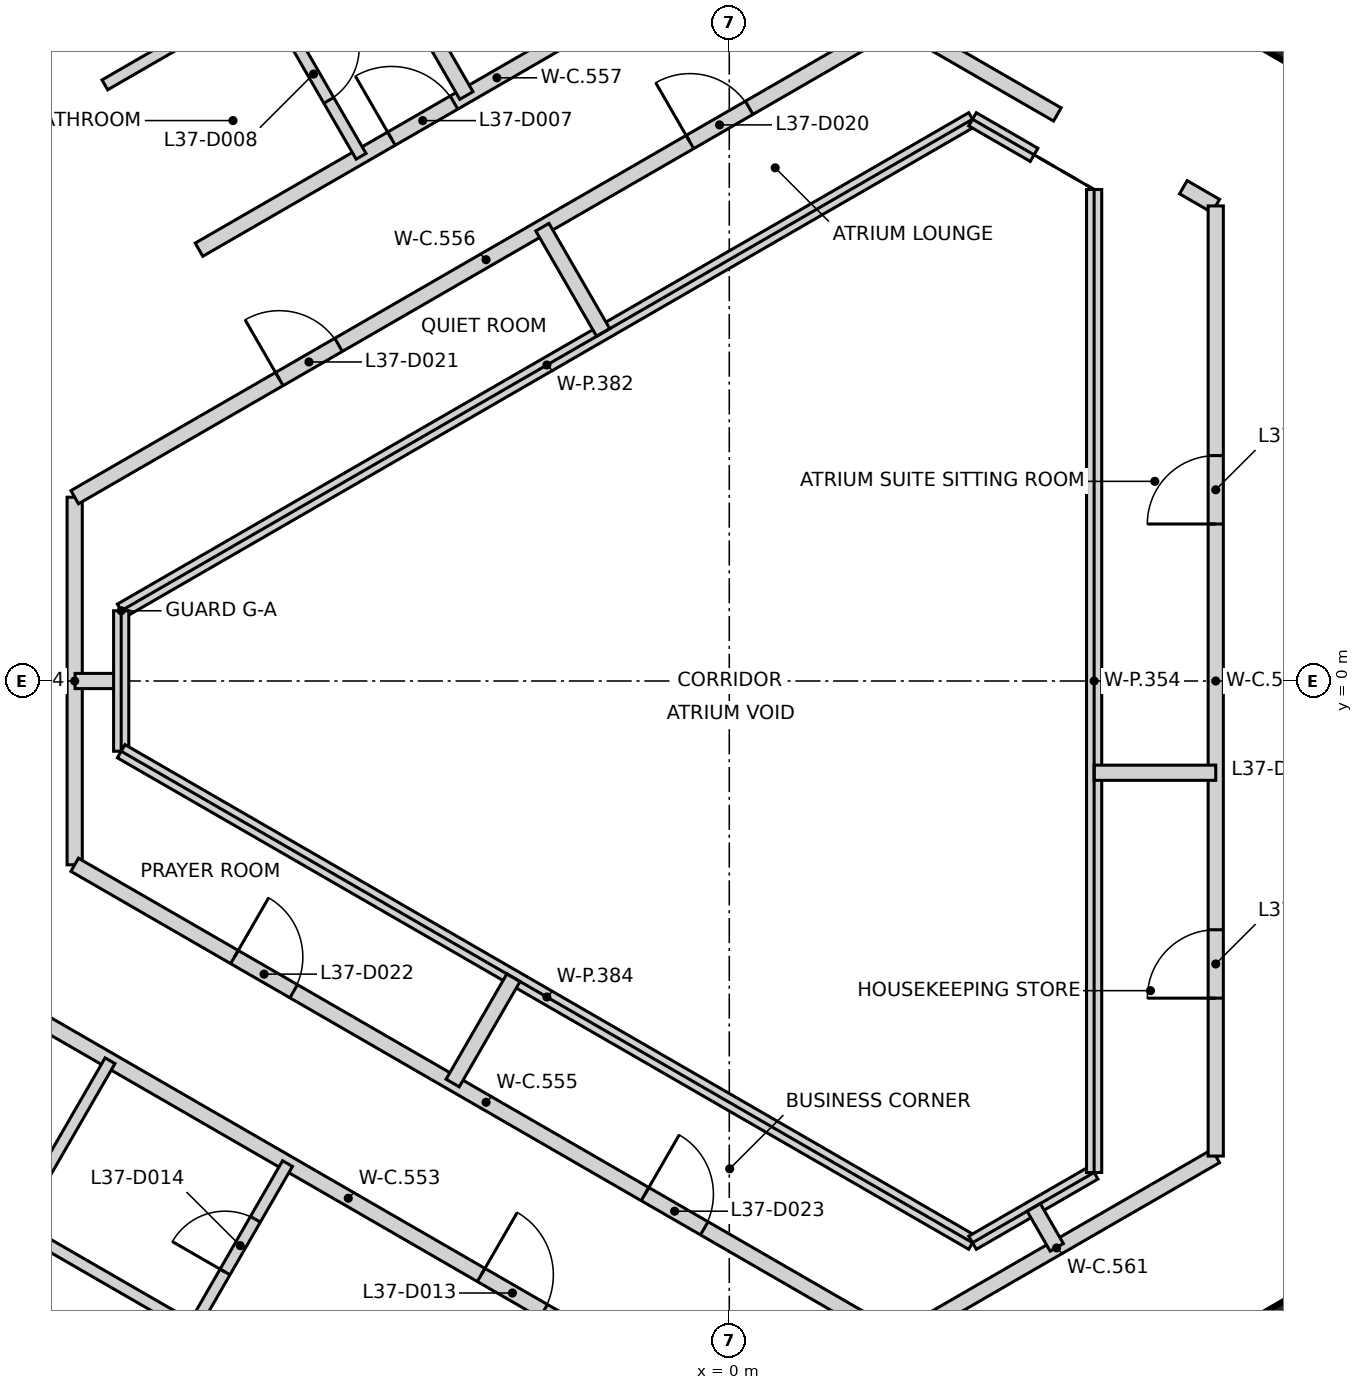
"""IFC4 building model, lengths in metres.
Left out: names, types, materials, properties, quantities, classifications, styles, units other than length and angle.
Written with IfcOpenShell. Run it as: python <this file> out.ifc"""

import sys

from ifc_helpers import new_model, si_unit, direction, frame, frame_2d, origin, place, context, subcontext, project, spatial, rectangle, extrude, element, fill, save


model = new_model("IFC4")
c1 = context("Model", 3, precision=1e-05, world=origin(), true_north=direction((0.0, 1.0)))
c2 = subcontext(c1, "Body", "Model", "MODEL_VIEW")
j1 = project(units=[si_unit("LENGTHUNIT", "METRE"), si_unit("PLANEANGLEUNIT", "RADIAN")], contexts=[c1])
p1 = place(None, origin())
s1 = spatial("IfcSite", under=j1, at=p1, CompositionType="ELEMENT")
p2 = place(p1, origin())
s2 = spatial("IfcBuilding", under=s1, at=p2, CompositionType="ELEMENT")
p3 = place(p2, frame((0.0, 0.0, 150.4)))
s3 = spatial("IfcBuildingStorey", under=s2, at=p3, CompositionType="ELEMENT", Elevation=150.4)
p4 = place(p3, frame((10.42, 6.498, 0.0), z_axis=(0.0, 0.0, 1.0), x_axis=(-0.866021906294, 0.500006057782, 0.0)))
e1 = element("IfcWall", 1, at=p4, inside=s3, PredefinedType="SHEAR", context=c2, shape_type="SweptSolid", body=[
    extrude(rectangle(XDim=11.55, YDim=0.25, at=frame_2d((5.775, 0.0))), origin(), (0.0, 0.0, 1.0), 3.2),
])
p5 = place(p4, frame((10.025, 0.0, 0.0)))
e2 = element("IfcOpeningElement", 2, at=p5, cuts=e1, PredefinedType="OPENING", context=c2, shape_type="SweptSolid", body=[
    extrude(rectangle(XDim=1.2, YDim=2.1, at=frame_2d((0.6, 1.05))), frame((0.0, 0.135, 0.0), z_axis=(0.0, -1.0, 0.0), x_axis=(1.0, 0.0, 0.0)), (0.0, 0.0, 1.0), 0.27),
])
p6 = place(p4, frame((8.725, 0.0, 0.0)))
e3 = element("IfcOpeningElement", 3, at=p6, cuts=e1, PredefinedType="OPENING", context=c2, shape_type="SweptSolid", body=[
    extrude(rectangle(XDim=1.2, YDim=2.1, at=frame_2d((0.6, 1.05))), frame((0.0, 0.135, 0.0), z_axis=(0.0, -1.0, 0.0), x_axis=(1.0, 0.0, 0.0)), (0.0, 0.0, 1.0), 0.27),
])
p7 = place(p3, frame((0.417, -12.273, 0.0), z_axis=(0.0, 0.0, 1.0), x_axis=(0.866021906294, 0.500006057782, 0.0)))
e4 = element("IfcWall", 4, at=p7, inside=s3, PredefinedType="SHEAR", context=c2, shape_type="SweptSolid", body=[
    extrude(rectangle(XDim=11.55, YDim=0.25, at=frame_2d((5.775, 0.0))), origin(), (0.0, 0.0, 1.0), 3.2),
])
p8 = place(p7, frame((10.025, 0.0, 0.0)))
e5 = element("IfcOpeningElement", 5, at=p8, cuts=e4, PredefinedType="OPENING", context=c2, shape_type="SweptSolid", body=[
    extrude(rectangle(XDim=1.2, YDim=2.1, at=frame_2d((0.6, 1.05))), frame((0.0, 0.135, 0.0), z_axis=(0.0, -1.0, 0.0), x_axis=(1.0, 0.0, 0.0)), (0.0, 0.0, 1.0), 0.27),
])
p9 = place(p7, frame((8.725, 0.0, 0.0)))
e6 = element("IfcOpeningElement", 6, at=p9, cuts=e4, PredefinedType="OPENING", context=c2, shape_type="SweptSolid", body=[
    extrude(rectangle(XDim=1.2, YDim=2.1, at=frame_2d((0.6, 1.05))), frame((0.0, 0.135, 0.0), z_axis=(0.0, -1.0, 0.0), x_axis=(1.0, 0.0, 0.0)), (0.0, 0.0, 1.0), 0.27),
])
p10 = place(p3, frame((-9.261, -4.351, 0.0), z_axis=(0.0, 0.0, 1.0), x_axis=(0.865985037707, -0.500069909581, 0.0)))
e7 = element("IfcWall", 7, at=p10, inside=s3, PredefinedType="PARTITIONING", context=c2, shape_type="SweptSolid", body=[
    extrude(rectangle(XDim=9.812, YDim=0.2, at=frame_2d((4.906, 0.0))), origin(), (0.0, 0.0, 1.0), 3.2),
])
p11 = place(p10, frame((6.925, 0.0, 0.0)))
e8 = element("IfcOpeningElement", 8, at=p11, cuts=e7, PredefinedType="OPENING", context=c2, shape_type="SweptSolid", body=[
    extrude(rectangle(XDim=0.95, YDim=2.1, at=frame_2d((0.475, 1.05))), frame((0.0, 0.11, 0.0), z_axis=(0.0, -1.0, 0.0), x_axis=(1.0, 0.0, 0.0)), (0.0, 0.0, 1.0), 0.22),
])
p12 = place(p3, frame((-8.612, -2.418, 0.0), z_axis=(0.0, 0.0, 1.0), x_axis=(0.0, 1.0, 0.0)))
e9 = element("IfcWall", 9, at=p12, inside=s3, PredefinedType="PARTITIONING", context=c2, shape_type="SweptSolid", body=[
    extrude(rectangle(XDim=4.836, YDim=0.2, at=frame_2d((2.418, 0.0))), origin(), (0.0, 0.0, 1.0), 2.3),
])
p13 = place(p3, frame((-8.612, -2.418, 0.0), z_axis=(0.0, 0.0, 1.0), x_axis=(0.866023916678, -0.500002575735, 0.0)))
e10 = element("IfcWall", 10, at=p13, inside=s3, PredefinedType="PARTITIONING", context=c2, shape_type="SweptSolid", body=[
    extrude(rectangle(XDim=12.499, YDim=0.2, at=frame_2d((6.249, 0.0))), origin(), (0.0, 0.0, 1.0), 3.2),
])
p14 = place(p13, frame((2.427, 0.0, 0.0)))
e11 = element("IfcOpeningElement", 11, at=p14, cuts=e10, PredefinedType="OPENING", context=c2, shape_type="SweptSolid", body=[
    extrude(rectangle(XDim=0.9, YDim=2.1, at=frame_2d((0.45, 1.05))), frame((0.0, 0.11, 0.0), z_axis=(0.0, -1.0, 0.0), x_axis=(1.0, 0.0, 0.0)), (0.0, 0.0, 1.0), 0.22),
])
p15 = place(p13, frame((8.665, 0.0, 0.0)))
e12 = element("IfcOpeningElement", 12, at=p15, cuts=e10, PredefinedType="OPENING", context=c2, shape_type="SweptSolid", body=[
    extrude(rectangle(XDim=0.9, YDim=2.1, at=frame_2d((0.45, 1.05))), frame((0.0, 0.11, 0.0), z_axis=(0.0, -1.0, 0.0), x_axis=(1.0, 0.0, 0.0)), (0.0, 0.0, 1.0), 0.22),
])
p16 = place(p3, frame((-8.612, 2.418, 0.0), z_axis=(0.0, 0.0, 1.0), x_axis=(0.866019033094, 0.500011034197, 0.0)))
e13 = element("IfcWall", 13, at=p16, inside=s3, PredefinedType="PARTITIONING", context=c2, shape_type="SweptSolid", body=[
    extrude(rectangle(XDim=12.498, YDim=0.2, at=frame_2d((6.249, 0.0))), origin(), (0.0, 0.0, 1.0), 3.2),
])
p17 = place(p16, frame((9.346, 0.0, 0.0)))
e14 = element("IfcOpeningElement", 14, at=p17, cuts=e13, PredefinedType="OPENING", context=c2, shape_type="SweptSolid", body=[
    extrude(rectangle(XDim=0.9, YDim=2.1, at=frame_2d((0.45, 1.05))), frame((0.0, 0.11, 0.0), z_axis=(0.0, -1.0, 0.0), x_axis=(1.0, 0.0, 0.0)), (0.0, 0.0, 1.0), 0.22),
])
p18 = place(p16, frame((3.109, 0.0, 0.0)))
e15 = element("IfcOpeningElement", 15, at=p18, cuts=e13, PredefinedType="OPENING", context=c2, shape_type="SweptSolid", body=[
    extrude(rectangle(XDim=0.9, YDim=2.1, at=frame_2d((0.45, 1.05))), frame((0.0, 0.11, 0.0), z_axis=(0.0, -1.0, 0.0), x_axis=(1.0, 0.0, 0.0)), (0.0, 0.0, 1.0), 0.22),
])
p19 = place(p3, frame((-6.976, 5.674, 0.0), z_axis=(0.0, 0.0, 1.0), x_axis=(0.8661469583, 0.499789402276, 0.0)))
e16 = element("IfcWall", 16, at=p19, inside=s3, PredefinedType="PARTITIONING", context=c2, shape_type="SweptSolid", body=[
    extrude(rectangle(XDim=9.05, YDim=0.2, at=frame_2d((4.525, 0.0))), origin(), (0.0, 0.0, 1.0), 3.2),
])
p20 = place(p19, frame((7.852, 0.0, 0.0)))
e17 = element("IfcOpeningElement", 17, at=p20, cuts=e16, PredefinedType="OPENING", context=c2, shape_type="SweptSolid", body=[
    extrude(rectangle(XDim=0.95, YDim=2.1, at=frame_2d((0.475, 1.05))), frame((0.0, 0.11, 0.0), z_axis=(0.0, -1.0, 0.0), x_axis=(1.0, 0.0, 0.0)), (0.0, 0.0, 1.0), 0.22),
])
p21 = place(p19, frame((2.923, 0.0, 0.0)))
e18 = element("IfcOpeningElement", 18, at=p21, cuts=e16, PredefinedType="OPENING", context=c2, shape_type="SweptSolid", body=[
    extrude(rectangle(XDim=0.95, YDim=2.1, at=frame_2d((0.475, 1.05))), frame((0.0, 0.11, 0.0), z_axis=(0.0, -1.0, 0.0), x_axis=(1.0, 0.0, 0.0)), (0.0, 0.0, 1.0), 0.22),
])
p22 = place(p3, frame((2.212, -8.667, 0.0), z_axis=(0.0, 0.0, 1.0), x_axis=(0.866053587187, 0.499951181737, 0.0)))
e19 = element("IfcWall", 19, at=p22, inside=s3, PredefinedType="PARTITIONING", context=c2, shape_type="SweptSolid", body=[
    extrude(rectangle(XDim=4.835, YDim=0.2, at=frame_2d((2.418, 0.0))), origin(), (0.0, 0.0, 1.0), 2.3),
])
p23 = place(p3, frame((2.213, 8.668, 0.0), z_axis=(0.0, 0.0, 1.0), x_axis=(0.866001461921, -0.500041466232, 0.0)))
e20 = element("IfcWall", 20, at=p23, inside=s3, PredefinedType="PARTITIONING", context=c2, shape_type="SweptSolid", body=[
    extrude(rectangle(XDim=2.429, YDim=0.2, at=frame_2d((1.214, 0.0))), origin(), (0.0, 0.0, 1.0), 2.3),
])
p24 = place(p3, frame((5.974, 6.496, 0.0), z_axis=(0.0, 0.0, 1.0), x_axis=(0.865788603161, -0.500409926597, 0.0)))
e21 = element("IfcWall", 21, at=p24, inside=s3, PredefinedType="PARTITIONING", context=c2, shape_type="SweptSolid", body=[
    extrude(rectangle(XDim=0.492, YDim=0.2, at=frame_2d((0.246, 0.0))), origin(), (0.0, 0.0, 1.0), 3.2),
])
p25 = place(p3, frame((6.4, -6.25, 0.0), z_axis=(0.0, 0.0, 1.0), x_axis=(0.0, 1.0, 0.0)))
e22 = element("IfcWall", 22, at=p25, inside=s3, PredefinedType="PARTITIONING", context=c2, shape_type="SweptSolid", body=[
    extrude(rectangle(XDim=12.5, YDim=0.2, at=frame_2d((6.25, 0.0))), origin(), (0.0, 0.0, 1.0), 3.2),
])
p26 = place(p25, frame((2.077, 0.0, 0.0)))
e23 = element("IfcOpeningElement", 23, at=p26, cuts=e22, PredefinedType="OPENING", context=c2, shape_type="SweptSolid", body=[
    extrude(rectangle(XDim=0.9, YDim=2.1, at=frame_2d((0.45, 1.05))), frame((0.0, 0.11, 0.0), z_axis=(0.0, -1.0, 0.0), x_axis=(1.0, 0.0, 0.0)), (0.0, 0.0, 1.0), 0.22),
])
p27 = place(p25, frame((8.315, 0.0, 0.0)))
e24 = element("IfcOpeningElement", 24, at=p27, cuts=e22, PredefinedType="OPENING", context=c2, shape_type="SweptSolid", body=[
    extrude(rectangle(XDim=0.9, YDim=2.1, at=frame_2d((0.45, 1.05))), frame((0.0, 0.11, 0.0), z_axis=(0.0, -1.0, 0.0), x_axis=(1.0, 0.0, 0.0)), (0.0, 0.0, 1.0), 0.22),
])
p28 = place(p3, frame((-10.071, 19.158, 0.0), z_axis=(0.0, 0.0, 1.0), x_axis=(0.499905140254, -0.866080164158, 0.0)))
e25 = element("IfcWall", 25, at=p28, inside=s3, PredefinedType="PARTITIONING", context=c2, shape_type="SweptSolid", body=[
    extrude(rectangle(XDim=13.227, YDim=0.2, at=frame_2d((6.613, 0.0))), origin(), (0.0, 0.0, 1.0), 2.3),
])
p29 = place(p3, frame((-8.607, 0.0, 0.0), z_axis=(0.0, 0.0, 1.0), x_axis=(1.0, 0.0, 0.0)))
e26 = element("IfcWall", 26, at=p29, inside=s3, PredefinedType="PARTITIONING", context=c2, shape_type="SweptSolid", body=[
    extrude(rectangle(XDim=0.607, YDim=0.2, at=frame_2d((0.303, 0.0))), origin(), (0.0, 0.0, 1.0), 2.3),
])
p30 = place(p3, frame((-8.0, 0.925, 0.0), z_axis=(0.0, 0.0, 1.0), x_axis=(0.866075250037, 0.499913653818, 0.0)))
e27 = element("IfcWall", 27, at=p30, inside=s3, PredefinedType="PARTITIONING", context=c2, shape_type="SweptSolid", body=[
    extrude(rectangle(XDim=12.932, YDim=0.2, at=frame_2d((6.466, 0.0))), origin(), (0.0, 0.0, 1.0), 2.3),
])
p31 = place(p3, frame((-8.0, -0.924, 0.0), z_axis=(0.0, 0.0, 1.0), x_axis=(0.0, 1.0, 0.0)))
e28 = element("IfcWall", 28, at=p31, inside=s3, PredefinedType="PARTITIONING", context=c2, shape_type="SweptSolid", body=[
    extrude(rectangle(XDim=1.848, YDim=0.2, at=frame_2d((0.924, 0.0))), origin(), (0.0, 0.0, 1.0), 2.3),
])
p32 = place(p3, frame((-8.0, -0.924, 0.0), z_axis=(0.0, 0.0, 1.0), x_axis=(0.866062358179, -0.499935987647, 0.0)))
e29 = element("IfcWall", 29, at=p32, inside=s3, PredefinedType="PARTITIONING", context=c2, shape_type="SweptSolid", body=[
    extrude(rectangle(XDim=12.932, YDim=0.2, at=frame_2d((6.466, 0.0))), origin(), (0.0, 0.0, 1.0), 2.3),
])
p33 = place(p3, frame((-3.639, -5.289, 0.0), z_axis=(0.0, 0.0, 1.0), x_axis=(0.49981490623, 0.866132241352, 0.0)))
e30 = element("IfcWall", 30, at=p33, inside=s3, PredefinedType="PARTITIONING", context=c2, shape_type="SweptSolid", body=[
    extrude(rectangle(XDim=1.6, YDim=0.2, at=frame_2d((0.8, 0.0))), origin(), (0.0, 0.0, 1.0), 2.3),
])
p34 = place(p3, frame((-2.459, 5.97, 0.0), z_axis=(0.0, 0.0, 1.0), x_axis=(0.499898632315, -0.866083920535, 0.0)))
e31 = element("IfcWall", 31, at=p34, inside=s3, PredefinedType="PARTITIONING", context=c2, shape_type="SweptSolid", body=[
    extrude(rectangle(XDim=1.599, YDim=0.2, at=frame_2d((0.8, 0.0))), origin(), (0.0, 0.0, 1.0), 3.2),
])
p35 = place(p3, frame((3.2, 7.39, 0.0), z_axis=(0.0, 0.0, 1.0), x_axis=(0.865985641702, -0.500068863623, 0.0)))
e32 = element("IfcWall", 32, at=p35, inside=s3, PredefinedType="PARTITIONING", context=c2, shape_type="SweptSolid", body=[
    extrude(rectangle(XDim=0.935, YDim=0.2, at=frame_2d((0.468, 0.0))), origin(), (0.0, 0.0, 1.0), 2.3),
])
p36 = place(p3, frame((3.2, -7.39, 0.0), z_axis=(0.0, 0.0, 1.0), x_axis=(0.865875248522, 0.500259986404, 0.0)))
e33 = element("IfcWall", 33, at=p36, inside=s3, PredefinedType="PARTITIONING", context=c2, shape_type="SweptSolid", body=[
    extrude(rectangle(XDim=1.848, YDim=0.2, at=frame_2d((0.924, 0.0))), origin(), (0.0, 0.0, 1.0), 2.3),
])
p37 = place(p3, frame((4.005, -6.925, 0.0), z_axis=(0.0, 0.0, 1.0), x_axis=(0.499942781752, -0.866058436235, 0.0)))
e34 = element("IfcWall", 34, at=p37, inside=s3, PredefinedType="PARTITIONING", context=c2, shape_type="SweptSolid", body=[
    extrude(rectangle(XDim=0.607, YDim=0.2, at=frame_2d((0.304, 0.0))), origin(), (0.0, 0.0, 1.0), 2.3),
])
p38 = place(p3, frame((4.8, -6.466, 0.0), z_axis=(0.0, 0.0, 1.0), x_axis=(0.0, 1.0, 0.0)))
e35 = element("IfcWall", 35, at=p38, inside=s3, PredefinedType="PARTITIONING", context=c2, shape_type="SweptSolid", body=[
    extrude(rectangle(XDim=12.932, YDim=0.2, at=frame_2d((6.466, 0.0))), origin(), (0.0, 0.0, 1.0), 2.3),
])
p39 = place(p3, frame((4.8, -1.207, 0.0), z_axis=(0.0, 0.0, 1.0), x_axis=(1.0, 0.0, 0.0)))
e36 = element("IfcWall", 36, at=p39, inside=s3, PredefinedType="PARTITIONING", context=c2, shape_type="SweptSolid", body=[
    extrude(rectangle(XDim=1.6, YDim=0.2, at=frame_2d((0.8, 0.0))), origin(), (0.0, 0.0, 1.0), 2.3),
])
p40 = place(p3, frame((-9.396, -7.159, 0.0), z_axis=(0.0, 0.0, 1.0), x_axis=(0.500091929049, 0.865972322018, 0.0)))
e37 = element("IfcWall", 37, at=p40, inside=s3, PredefinedType="PARTITIONING", context=c2, shape_type="SweptSolid", body=[
    extrude(rectangle(XDim=2.498, YDim=0.15, at=frame_2d((1.249, 0.0))), origin(), (0.0, 0.0, 1.0), 3.2),
])
p41 = place(p3, frame((-9.393, -7.164, 0.0), z_axis=(0.0, 0.0, 1.0), x_axis=(0.866098020528, -0.499874203012, 0.0)))
e38 = element("IfcWall", 38, at=p41, inside=s3, PredefinedType="PARTITIONING", context=c2, shape_type="SweptSolid", body=[
    extrude(rectangle(XDim=2.693, YDim=0.15, at=frame_2d((1.346, 0.0))), origin(), (0.0, 0.0, 1.0), 3.2),
])
p42 = place(p3, frame((-8.215, 7.843, 0.0), z_axis=(0.0, 0.0, 1.0), x_axis=(0.865983065851, 0.500073324283, 0.0)))
e39 = element("IfcWall", 39, at=p42, inside=s3, PredefinedType="PARTITIONING", context=c2, shape_type="SweptSolid", body=[
    extrude(rectangle(XDim=2.449, YDim=0.15, at=frame_2d((1.225, 0.0))), origin(), (0.0, 0.0, 1.0), 3.2),
])
p43 = place(p3, frame((-7.056, -8.507, 0.0), z_axis=(0.0, 0.0, 1.0), x_axis=(0.499397145068, 0.866373182582, 0.0)))
e40 = element("IfcWall", 40, at=p43, inside=s3, PredefinedType="PARTITIONING", context=c2, shape_type="SweptSolid", body=[
    extrude(rectangle(XDim=2.491, YDim=0.15, at=frame_2d((1.245, 0.0))), origin(), (0.0, 0.0, 1.0), 3.2),
])
p44 = place(p43, frame((0.845, 0.0, 0.0)))
e41 = element("IfcOpeningElement", 41, at=p44, cuts=e40, PredefinedType="OPENING", context=c2, shape_type="SweptSolid", body=[
    extrude(rectangle(XDim=0.8, YDim=2.1, at=frame_2d((0.4, 1.05))), frame((0.0, 0.085, 0.0), z_axis=(0.0, -1.0, 0.0), x_axis=(1.0, 0.0, 0.0)), (0.0, 0.0, 1.0), 0.17),
])
p45 = place(p3, frame((-6.094, 9.068, 0.0), z_axis=(0.0, 0.0, 1.0), x_axis=(0.500004234368, -0.866022959057, 0.0)))
e42 = element("IfcWall", 42, at=p45, inside=s3, PredefinedType="PARTITIONING", context=c2, shape_type="SweptSolid", body=[
    extrude(rectangle(XDim=2.5, YDim=0.15, at=frame_2d((1.25, 0.0))), origin(), (0.0, 0.0, 1.0), 3.2),
])
p46 = place(p45, frame((0.85, 0.0, 0.0)))
e43 = element("IfcOpeningElement", 43, at=p46, cuts=e42, PredefinedType="OPENING", context=c2, shape_type="SweptSolid", body=[
    extrude(rectangle(XDim=0.8, YDim=2.1, at=frame_2d((0.4, 1.05))), frame((0.0, 0.085, 0.0), z_axis=(0.0, -1.0, 0.0), x_axis=(1.0, 0.0, 0.0)), (0.0, 0.0, 1.0), 0.17),
])
p47 = place(p21, origin())
e44 = element("IfcDoor", 44, at=p47, inside=s3, OperationType="SINGLE_SWING_LEFT", PredefinedType="DOOR", context=c2, shape_type="SweptSolid", body=[
    extrude(rectangle(XDim=0.95, YDim=2.1, at=frame_2d((0.475, 1.05))), frame((0.0, 0.025, 0.0), z_axis=(0.0, -1.0, 0.0), x_axis=(1.0, 0.0, 0.0)), (0.0, 0.0, 1.0), 0.05),
])
fill(e18, e44)
p48 = place(p46, frame((0.8, 0.0, 0.0), z_axis=(0.0, 0.0, 1.0), x_axis=(-1.0, 0.0, 0.0)))
e45 = element("IfcDoor", 45, at=p48, inside=s3, OperationType="SINGLE_SWING_LEFT", PredefinedType="DOOR", context=c2, shape_type="SweptSolid", body=[
    extrude(rectangle(XDim=0.8, YDim=2.1, at=frame_2d((0.4, 1.05))), frame((0.0, 0.025, 0.0), z_axis=(0.0, -1.0, 0.0), x_axis=(1.0, 0.0, 0.0)), (0.0, 0.0, 1.0), 0.05),
])
fill(e43, e45)
p49 = place(p11, frame((0.95, 0.0, 0.0), z_axis=(0.0, 0.0, 1.0), x_axis=(-1.0, 0.0, 0.0)))
e46 = element("IfcDoor", 46, at=p49, inside=s3, OperationType="SINGLE_SWING_LEFT", PredefinedType="DOOR", context=c2, shape_type="SweptSolid", body=[
    extrude(rectangle(XDim=0.95, YDim=2.1, at=frame_2d((0.475, 1.05))), frame((0.0, 0.025, 0.0), z_axis=(0.0, -1.0, 0.0), x_axis=(1.0, 0.0, 0.0)), (0.0, 0.0, 1.0), 0.05),
])
fill(e8, e46)
p50 = place(p44, origin())
e47 = element("IfcDoor", 47, at=p50, inside=s3, OperationType="SINGLE_SWING_LEFT", PredefinedType="DOOR", context=c2, shape_type="SweptSolid", body=[
    extrude(rectangle(XDim=0.8, YDim=2.1, at=frame_2d((0.4, 1.05))), frame((0.0, 0.025, 0.0), z_axis=(0.0, -1.0, 0.0), x_axis=(1.0, 0.0, 0.0)), (0.0, 0.0, 1.0), 0.05),
])
fill(e41, e47)
p51 = place(p26, origin())
e48 = element("IfcDoor", 48, at=p51, inside=s3, OperationType="SINGLE_SWING_LEFT", PredefinedType="DOOR", context=c2, shape_type="SweptSolid", body=[
    extrude(rectangle(XDim=0.9, YDim=2.1, at=frame_2d((0.45, 1.05))), frame((0.0, 0.025, 0.0), z_axis=(0.0, -1.0, 0.0), x_axis=(1.0, 0.0, 0.0)), (0.0, 0.0, 1.0), 0.05),
])
fill(e23, e48)
p52 = place(p27, origin())
e49 = element("IfcDoor", 49, at=p52, inside=s3, OperationType="SINGLE_SWING_LEFT", PredefinedType="DOOR", context=c2, shape_type="SweptSolid", body=[
    extrude(rectangle(XDim=0.9, YDim=2.1, at=frame_2d((0.45, 1.05))), frame((0.0, 0.025, 0.0), z_axis=(0.0, -1.0, 0.0), x_axis=(1.0, 0.0, 0.0)), (0.0, 0.0, 1.0), 0.05),
])
fill(e24, e49)
p53 = place(p17, frame((0.9, 0.0, 0.0), z_axis=(0.0, 0.0, 1.0), x_axis=(-1.0, 0.0, 0.0)))
e50 = element("IfcDoor", 50, at=p53, inside=s3, OperationType="SINGLE_SWING_LEFT", PredefinedType="DOOR", context=c2, shape_type="SweptSolid", body=[
    extrude(rectangle(XDim=0.9, YDim=2.1, at=frame_2d((0.45, 1.05))), frame((0.0, 0.025, 0.0), z_axis=(0.0, -1.0, 0.0), x_axis=(1.0, 0.0, 0.0)), (0.0, 0.0, 1.0), 0.05),
])
fill(e14, e50)
p54 = place(p18, frame((0.9, 0.0, 0.0), z_axis=(0.0, 0.0, 1.0), x_axis=(-1.0, 0.0, 0.0)))
e51 = element("IfcDoor", 51, at=p54, inside=s3, OperationType="SINGLE_SWING_LEFT", PredefinedType="DOOR", context=c2, shape_type="SweptSolid", body=[
    extrude(rectangle(XDim=0.9, YDim=2.1, at=frame_2d((0.45, 1.05))), frame((0.0, 0.025, 0.0), z_axis=(0.0, -1.0, 0.0), x_axis=(1.0, 0.0, 0.0)), (0.0, 0.0, 1.0), 0.05),
])
fill(e15, e51)
p55 = place(p14, origin())
e52 = element("IfcDoor", 52, at=p55, inside=s3, OperationType="SINGLE_SWING_LEFT", PredefinedType="DOOR", context=c2, shape_type="SweptSolid", body=[
    extrude(rectangle(XDim=0.9, YDim=2.1, at=frame_2d((0.45, 1.05))), frame((0.0, 0.025, 0.0), z_axis=(0.0, -1.0, 0.0), x_axis=(1.0, 0.0, 0.0)), (0.0, 0.0, 1.0), 0.05),
])
fill(e11, e52)
p56 = place(p15, origin())
e53 = element("IfcDoor", 53, at=p56, inside=s3, OperationType="SINGLE_SWING_LEFT", PredefinedType="DOOR", context=c2, shape_type="SweptSolid", body=[
    extrude(rectangle(XDim=0.9, YDim=2.1, at=frame_2d((0.45, 1.05))), frame((0.0, 0.025, 0.0), z_axis=(0.0, -1.0, 0.0), x_axis=(1.0, 0.0, 0.0)), (0.0, 0.0, 1.0), 0.05),
])
fill(e12, e53)
save(model, sys.argv[1])
